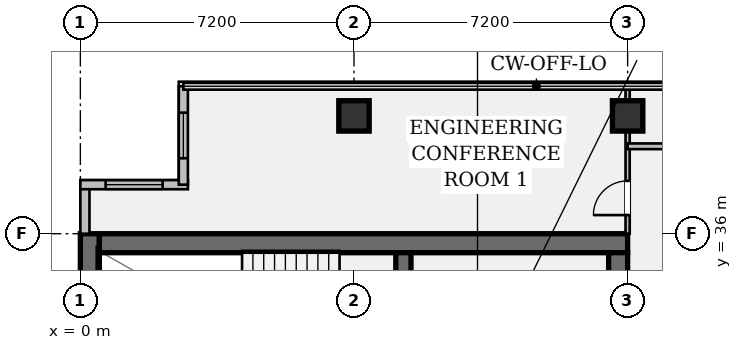
"""IFC4 building model, lengths in metres.
Left out: names, types, materials, properties, quantities, classifications, styles, units other than length and angle.
Written with IfcOpenShell. Run it as: python <this file> out.ifc"""

import sys

from ifc_helpers import new_model, si_unit, direction, frame, frame_2d, origin, origin_2d, place, context, subcontext, project, spatial, rectangle, hollow_rectangle, extrude, element, fill, save


model = new_model("IFC4")
c1 = context("Model", 3, precision=1e-05, world=origin(), true_north=direction((0.0, 1.0)))
c2 = subcontext(c1, "Body", "Model", "MODEL_VIEW")
j1 = project(units=[si_unit("LENGTHUNIT", "METRE"), si_unit("PLANEANGLEUNIT", "RADIAN")], contexts=[c1])
p1 = place(None, origin())
s1 = spatial("IfcSite", under=j1, at=p1, CompositionType="ELEMENT")
p2 = place(p1, origin())
s2 = spatial("IfcBuilding", under=s1, at=p2, CompositionType="ELEMENT")
p3 = place(p2, frame((0.0, 0.0, 197.75)))
s3 = spatial("IfcBuildingStorey", under=s2, at=p3, CompositionType="ELEMENT", Elevation=197.75)
p4 = place(p3, frame((0.25, 7.2, 0.0), z_axis=(0.0, 0.0, 1.0), x_axis=(0.0, 1.0, 0.0)))
e1 = element("IfcWall", 1, at=p4, inside=s3, PredefinedType="SHEAR", context=c2, shape_type="SweptSolid", body=[
    extrude(rectangle(XDim=28.8, YDim=0.5, at=frame_2d((14.4, 0.0))), origin(), (0.0, 0.0, 1.0), 3.24),
])
p5 = place(p3, frame((0.5, 35.75, 0.0), z_axis=(0.0, 0.0, 1.0), x_axis=(1.0, 0.0, 0.0)))
e2 = element("IfcWall", 2, at=p5, inside=s3, PredefinedType="SHEAR", context=c2, shape_type="SweptSolid", body=[
    extrude(rectangle(XDim=13.9, YDim=0.5, at=frame_2d((6.95, 0.0))), origin(), (0.0, 0.0, 1.0), 3.24),
])
p6 = place(p3, frame((14.15, 35.5, 0.0), z_axis=(0.0, 0.0, 1.0), x_axis=(0.0, -1.0, 0.0)))
e3 = element("IfcWall", 3, at=p6, inside=s3, PredefinedType="SHEAR", context=c2, shape_type="SweptSolid", body=[
    extrude(rectangle(XDim=27.8, YDim=0.5, at=frame_2d((13.9, 0.0))), origin(), (0.0, 0.0, 1.0), 3.24),
])
p7 = place(p6, frame((1.4, 0.0, 0.0)))
e4 = element("IfcOpeningElement", 4, at=p7, cuts=e3, PredefinedType="OPENING", context=c2, shape_type="SweptSolid", body=[
    extrude(rectangle(XDim=1.2, YDim=2.15, at=frame_2d((0.6, 1.075))), frame((0.0, 0.262, 0.0), z_axis=(0.0, -1.0, 0.0), x_axis=(1.0, 0.0, 0.0)), (0.0, 0.0, 1.0), 0.524),
])
p8 = place(p6, frame((25.35, 0.0, 0.0)))
e5 = element("IfcOpeningElement", 5, at=p8, cuts=e3, PredefinedType="OPENING", context=c2, shape_type="SweptSolid", body=[
    extrude(rectangle(XDim=1.2, YDim=2.15, at=frame_2d((0.6, 1.075))), frame((0.0, 0.262, 0.0), z_axis=(0.0, -1.0, 0.0), x_axis=(1.0, 0.0, 0.0)), (0.0, 0.0, 1.0), 0.524),
])
p9 = place(p6, frame((14.7, 0.0, 0.0)))
e6 = element("IfcOpeningElement", 6, at=p9, cuts=e3, PredefinedType="OPENING", context=c2, shape_type="SweptSolid", body=[
    extrude(rectangle(XDim=1.6, YDim=2.2, at=frame_2d((0.8, 1.1))), frame((0.0, 0.262, 0.0), z_axis=(0.0, -1.0, 0.0), x_axis=(1.0, 0.0, 0.0)), (0.0, 0.0, 1.0), 0.524),
])
p10 = place(p3, frame((8.5, 31.72, 0.0), z_axis=(0.0, 0.0, 1.0), x_axis=(0.0, 1.0, 0.0)))
e7 = element("IfcWall", 7, at=p10, inside=s3, PredefinedType="SHEAR", context=c2, shape_type="SweptSolid", body=[
    extrude(rectangle(XDim=3.78, YDim=0.4, at=frame_2d((1.89, 0.0))), origin(), (0.0, 0.0, 1.0), 3.24),
])
p11 = place(p10, frame((0.9, 0.0, 0.0)))
e8 = element("IfcOpeningElement", 8, at=p11, cuts=e7, PredefinedType="OPENING", context=c2, shape_type="SweptSolid", body=[
    extrude(rectangle(XDim=1.1, YDim=2.15, at=frame_2d((0.55, 1.075))), frame((0.0, 0.212, 0.0), z_axis=(0.0, -1.0, 0.0), x_axis=(1.0, 0.0, 0.0)), (0.0, 0.0, 1.0), 0.424),
])
for number, where, z_axis, x_axis in (
    (9, (7.2, 39.1, 0.0), (0.0, 0.0, 1.0), (1.0, 0.0, 0.0)),
    (10, (14.4, 39.1, 0.0), (0.0, 0.0, 1.0), (1.0, 0.0, 0.0)),
):
    element("IfcColumn", number, at=place(p3, frame(where, z_axis=z_axis, x_axis=x_axis)), inside=s3, PredefinedType="COLUMN", context=c2, shape_type="SweptSolid", body=[
        extrude(hollow_rectangle(XDim=0.8, YDim=0.8, WallThickness=0.05, at=origin_2d()), origin(), (0.0, 0.0, 1.0), 3.24),
    ])
p12 = place(p3, frame((0.12, 36.0, 0.0), z_axis=(0.0, 0.0, 1.0), x_axis=(0.0, 1.0, 0.0)))
e11 = element("IfcWall", 11, at=p12, inside=s3, PredefinedType="STANDARD", context=c2, shape_type="SweptSolid", body=[
    extrude(rectangle(XDim=1.29, YDim=0.24, at=frame_2d((0.645, 0.0))), origin(), (0.0, 0.0, 1.0), 3.24),
])
p13 = place(p3, frame((0.0, 37.29, 0.0), z_axis=(0.0, 0.0, 1.0), x_axis=(1.0, 0.0, 0.0)))
e12 = element("IfcWall", 12, at=p13, inside=s3, PredefinedType="STANDARD", context=c2, shape_type="SweptSolid", body=[
    extrude(rectangle(XDim=2.83, YDim=0.24, at=frame_2d((1.415, 0.0))), origin(), (0.0, 0.0, 1.0), 3.24),
])
p14 = place(p13, frame((0.665, 0.0, 0.95)))
e13 = element("IfcOpeningElement", 13, at=p14, cuts=e12, PredefinedType="OPENING", context=c2, shape_type="SweptSolid", body=[
    extrude(rectangle(XDim=1.5, YDim=1.8, at=frame_2d((0.75, 0.9))), frame((0.0, 0.132, 0.0), z_axis=(0.0, -1.0, 0.0), x_axis=(1.0, 0.0, 0.0)), (0.0, 0.0, 1.0), 0.264),
])
p15 = place(p3, frame((2.71, 37.29, 0.0), z_axis=(0.0, 0.0, 1.0), x_axis=(0.0, 1.0, 0.0)))
e14 = element("IfcWall", 14, at=p15, inside=s3, PredefinedType="STANDARD", context=c2, shape_type="SweptSolid", body=[
    extrude(rectangle(XDim=2.59, YDim=0.24, at=frame_2d((1.295, 0.0))), origin(), (0.0, 0.0, 1.0), 3.24),
])
p16 = place(p15, frame((0.695, 0.0, 0.95)))
e15 = element("IfcOpeningElement", 15, at=p16, cuts=e14, PredefinedType="OPENING", context=c2, shape_type="SweptSolid", body=[
    extrude(rectangle(XDim=1.2, YDim=1.8, at=frame_2d((0.6, 0.9))), frame((0.0, 0.132, 0.0), z_axis=(0.0, -1.0, 0.0), x_axis=(1.0, 0.0, 0.0)), (0.0, 0.0, 1.0), 0.264),
])
p17 = place(p3, frame((14.4, 36.0, 0.0), z_axis=(0.0, 0.0, 1.0), x_axis=(0.0, 1.0, 0.0)))
e16 = element("IfcWall", 16, at=p17, inside=s3, PredefinedType="PARTITIONING", context=c2, shape_type="SweptSolid", body=[
    extrude(rectangle(XDim=3.88, YDim=0.11, at=frame_2d((1.94, 0.0))), origin(), (0.0, 0.0, 1.0), 2.613),
])
p18 = place(p17, frame((0.49, 0.0, 0.0)))
e17 = element("IfcOpeningElement", 17, at=p18, cuts=e16, PredefinedType="OPENING", context=c2, shape_type="SweptSolid", body=[
    extrude(rectangle(XDim=0.9, YDim=2.15, at=frame_2d((0.45, 1.075))), frame((0.0, 0.067, 0.0), z_axis=(0.0, -1.0, 0.0), x_axis=(1.0, 0.0, 0.0)), (0.0, 0.0, 1.0), 0.134),
])
p19 = place(p3, frame((14.4, 38.3, 0.0), z_axis=(0.0, 0.0, 1.0), x_axis=(1.0, 0.0, 0.0)))
e18 = element("IfcWall", 18, at=p19, inside=s3, PredefinedType="PARTITIONING", context=c2, shape_type="SweptSolid", body=[
    extrude(rectangle(XDim=2.95, YDim=0.15, at=frame_2d((1.475, 0.0))), origin(), (0.0, 0.0, 1.0), 3.24),
])
p20 = place(p19, frame((1.54, 0.0, 0.0)))
e19 = element("IfcOpeningElement", 19, at=p20, cuts=e18, PredefinedType="OPENING", context=c2, shape_type="SweptSolid", body=[
    extrude(rectangle(XDim=0.88, YDim=2.15, at=frame_2d((0.44, 1.075))), frame((0.0, 0.087, 0.0), z_axis=(0.0, -1.0, 0.0), x_axis=(1.0, 0.0, 0.0)), (0.0, 0.0, 1.0), 0.174),
])
p21 = place(p14, origin())
e20 = element("IfcWindow", 20, at=p21, inside=s3, PartitioningType="SINGLE_PANEL", PredefinedType="WINDOW", context=c2, shape_type="SweptSolid", body=[
    extrude(rectangle(XDim=1.5, YDim=1.8, at=frame_2d((0.75, 0.9))), frame((0.0, 0.03, 0.0), z_axis=(0.0, -1.0, 0.0), x_axis=(1.0, 0.0, 0.0)), (0.0, 0.0, 1.0), 0.06),
])
fill(e13, e20)
p22 = place(p16, origin())
e21 = element("IfcWindow", 21, at=p22, inside=s3, PartitioningType="SINGLE_PANEL", PredefinedType="WINDOW", context=c2, shape_type="SweptSolid", body=[
    extrude(rectangle(XDim=1.2, YDim=1.8, at=frame_2d((0.6, 0.9))), frame((0.0, 0.03, 0.0), z_axis=(0.0, -1.0, 0.0), x_axis=(1.0, 0.0, 0.0)), (0.0, 0.0, 1.0), 0.06),
])
fill(e15, e21)
p23 = place(p18, origin())
e22 = element("IfcDoor", 22, at=p23, inside=s3, OperationType="SINGLE_SWING_LEFT", PredefinedType="DOOR", context=c2, shape_type="SweptSolid", body=[
    extrude(rectangle(XDim=0.9, YDim=2.15, at=frame_2d((0.45, 1.075))), frame((0.0, 0.025, 0.0), z_axis=(0.0, -1.0, 0.0), x_axis=(1.0, 0.0, 0.0)), (0.0, 0.0, 1.0), 0.05),
])
fill(e17, e22)
save(model, sys.argv[1])
